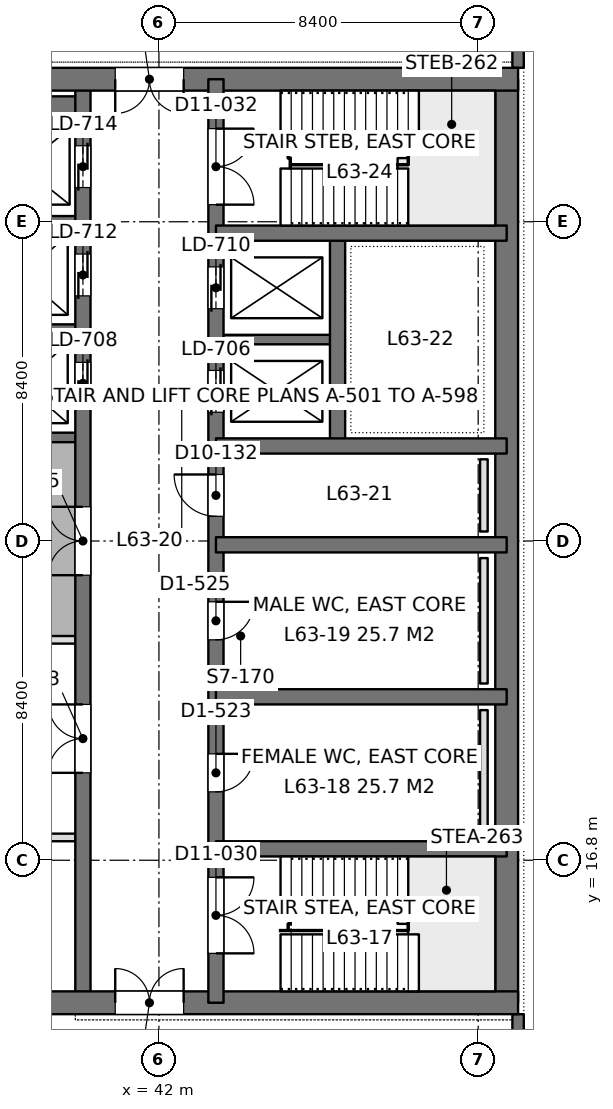
"""IFC4 building model, lengths in metres.
Left out: names, types, materials, properties, quantities, classifications, styles, units other than length and angle.
Written with IfcOpenShell. Run it as: python <this file> out.ifc"""

import sys

from ifc_helpers import new_model, si_unit, direction, frame, frame_2d, origin, place, context, subcontext, project, spatial, rectangle, extrude, element, fill, save


model = new_model("IFC4")
c1 = context("Model", 3, precision=1e-05, world=origin(), true_north=direction((0.0, 1.0)))
c2 = subcontext(c1, "Body", "Model", "MODEL_VIEW")
j1 = project(units=[si_unit("LENGTHUNIT", "METRE"), si_unit("PLANEANGLEUNIT", "RADIAN")], contexts=[c1])
p1 = place(None, origin())
s1 = spatial("IfcSite", under=j1, at=p1, CompositionType="ELEMENT")
p2 = place(p1, origin())
s2 = spatial("IfcBuilding", under=s1, at=p2, CompositionType="ELEMENT")
p3 = place(p2, frame((0.0, 0.0, 277.2)))
s3 = spatial("IfcBuildingStorey", under=s2, at=p3, CompositionType="ELEMENT", Elevation=277.2)
p4 = place(p3, frame((33.75, 13.05, 0.0), z_axis=(0.0, 0.0, 1.0), x_axis=(1.0, 0.0, 0.0)))
e1 = element("IfcWall", 1, at=p4, inside=s3, PredefinedType="SHEAR", context=c2, shape_type="SweptSolid", body=[
    extrude(rectangle(XDim=17.7, YDim=0.6, at=frame_2d((8.85, 0.0))), origin(), (0.0, 0.0, 1.0), 4.5),
])
p5 = place(p4, frame((7.1, 0.0, 0.0)))
e2 = element("IfcOpeningElement", 2, at=p5, cuts=e1, PredefinedType="OPENING", context=c2, shape_type="SweptSolid", body=[
    extrude(rectangle(XDim=1.8, YDim=2.4, at=frame_2d((0.9, 1.2))), frame((0.0, 0.31, 0.0), z_axis=(0.0, -1.0, 0.0), x_axis=(1.0, 0.0, 0.0)), (0.0, 0.0, 1.0), 0.62),
])
p6 = place(p3, frame((33.75, 37.35, 0.0), z_axis=(0.0, 0.0, 1.0), x_axis=(1.0, 0.0, 0.0)))
e3 = element("IfcWall", 3, at=p6, inside=s3, PredefinedType="SHEAR", context=c2, shape_type="SweptSolid", body=[
    extrude(rectangle(XDim=17.7, YDim=0.6, at=frame_2d((8.85, 0.0))), origin(), (0.0, 0.0, 1.0), 4.5),
])
p7 = place(p6, frame((7.1, 0.0, 0.0)))
e4 = element("IfcOpeningElement", 4, at=p7, cuts=e3, PredefinedType="OPENING", context=c2, shape_type="SweptSolid", body=[
    extrude(rectangle(XDim=1.8, YDim=2.4, at=frame_2d((0.9, 1.2))), frame((0.0, 0.31, 0.0), z_axis=(0.0, -1.0, 0.0), x_axis=(1.0, 0.0, 0.0)), (0.0, 0.0, 1.0), 0.62),
])
p8 = place(p3, frame((51.15, 13.05, 0.0), z_axis=(0.0, 0.0, 1.0), x_axis=(0.0, 1.0, 0.0)))
e5 = element("IfcWall", 5, at=p8, inside=s3, PredefinedType="SHEAR", context=c2, shape_type="SweptSolid", body=[
    extrude(rectangle(XDim=24.3, YDim=0.6, at=frame_2d((12.15, 0.0))), origin(), (0.0, 0.0, 1.0), 4.5),
])
p9 = place(p3, frame((43.5, 13.05, 0.0), z_axis=(0.0, 0.0, 1.0), x_axis=(0.0, 1.0, 0.0)))
e6 = element("IfcWall", 6, at=p9, inside=s3, PredefinedType="SHEAR", context=c2, shape_type="SweptSolid", body=[
    extrude(rectangle(XDim=24.3, YDim=0.4, at=frame_2d((12.15, 0.0))), origin(), (0.0, 0.0, 1.0), 4.5),
])
p10 = place(p9, frame((1.3, 0.0, 0.0)))
e7 = element("IfcOpeningElement", 7, at=p10, cuts=e6, PredefinedType="OPENING", context=c2, shape_type="SweptSolid", body=[
    extrude(rectangle(XDim=2.0, YDim=2.2, at=frame_2d((1.0, 1.1))), frame((0.0, 0.21, 0.0), z_axis=(0.0, -1.0, 0.0), x_axis=(1.0, 0.0, 0.0)), (0.0, 0.0, 1.0), 0.42),
])
p11 = place(p9, frame((21.0, 0.0, 0.0)))
e8 = element("IfcOpeningElement", 8, at=p11, cuts=e6, PredefinedType="OPENING", context=c2, shape_type="SweptSolid", body=[
    extrude(rectangle(XDim=2.0, YDim=2.2, at=frame_2d((1.0, 1.1))), frame((0.0, 0.21, 0.0), z_axis=(0.0, -1.0, 0.0), x_axis=(1.0, 0.0, 0.0)), (0.0, 0.0, 1.0), 0.42),
])
p12 = place(p9, frame((5.55, 0.0, 0.0)))
e9 = element("IfcOpeningElement", 9, at=p12, cuts=e6, PredefinedType="OPENING", context=c2, shape_type="SweptSolid", body=[
    extrude(rectangle(XDim=1.0, YDim=2.2, at=frame_2d((0.5, 1.1))), frame((0.0, 0.21, 0.0), z_axis=(0.0, -1.0, 0.0), x_axis=(1.0, 0.0, 0.0)), (0.0, 0.0, 1.0), 0.42),
])
p13 = place(p9, frame((9.55, 0.0, 0.0)))
e10 = element("IfcOpeningElement", 10, at=p13, cuts=e6, PredefinedType="OPENING", context=c2, shape_type="SweptSolid", body=[
    extrude(rectangle(XDim=1.0, YDim=2.2, at=frame_2d((0.5, 1.1))), frame((0.0, 0.21, 0.0), z_axis=(0.0, -1.0, 0.0), x_axis=(1.0, 0.0, 0.0)), (0.0, 0.0, 1.0), 0.42),
])
p14 = place(p9, frame((12.8, 0.0, 0.0)))
e11 = element("IfcOpeningElement", 11, at=p14, cuts=e6, PredefinedType="OPENING", context=c2, shape_type="SweptSolid", body=[
    extrude(rectangle(XDim=1.1, YDim=2.2, at=frame_2d((0.55, 1.1))), frame((0.0, 0.21, 0.0), z_axis=(0.0, -1.0, 0.0), x_axis=(1.0, 0.0, 0.0)), (0.0, 0.0, 1.0), 0.42),
])
p15 = place(p9, frame((15.538, 0.0, 0.0)))
e12 = element("IfcOpeningElement", 12, at=p15, cuts=e6, PredefinedType="OPENING", context=c2, shape_type="SweptSolid", body=[
    extrude(rectangle(XDim=1.1, YDim=2.2, at=frame_2d((0.55, 1.1))), frame((0.0, 0.21, 0.0), z_axis=(0.0, -1.0, 0.0), x_axis=(1.0, 0.0, 0.0)), (0.0, 0.0, 1.0), 0.42),
])
p16 = place(p9, frame((18.262, 0.0, 0.0)))
e13 = element("IfcOpeningElement", 13, at=p16, cuts=e6, PredefinedType="OPENING", context=c2, shape_type="SweptSolid", body=[
    extrude(rectangle(XDim=1.1, YDim=2.2, at=frame_2d((0.55, 1.1))), frame((0.0, 0.21, 0.0), z_axis=(0.0, -1.0, 0.0), x_axis=(1.0, 0.0, 0.0)), (0.0, 0.0, 1.0), 0.42),
])
p17 = place(p3, frame((40.0, 13.05, 0.0), z_axis=(0.0, 0.0, 1.0), x_axis=(0.0, 1.0, 0.0)))
e14 = element("IfcWall", 14, at=p17, inside=s3, PredefinedType="SHEAR", context=c2, shape_type="SweptSolid", body=[
    extrude(rectangle(XDim=24.3, YDim=0.4, at=frame_2d((12.15, 0.0))), origin(), (0.0, 0.0, 1.0), 4.5),
])
p18 = place(p17, frame((15.75, 0.0, 0.0)))
e15 = element("IfcOpeningElement", 15, at=p18, cuts=e14, PredefinedType="OPENING", context=c2, shape_type="SweptSolid", body=[
    extrude(rectangle(XDim=1.1, YDim=2.2, at=frame_2d((0.55, 1.1))), frame((0.0, 0.21, 0.0), z_axis=(0.0, -1.0, 0.0), x_axis=(1.0, 0.0, 0.0)), (0.0, 0.0, 1.0), 0.42),
])
p19 = place(p17, frame((18.6, 0.0, 0.0)))
e16 = element("IfcOpeningElement", 16, at=p19, cuts=e14, PredefinedType="OPENING", context=c2, shape_type="SweptSolid", body=[
    extrude(rectangle(XDim=1.1, YDim=2.2, at=frame_2d((0.55, 1.1))), frame((0.0, 0.21, 0.0), z_axis=(0.0, -1.0, 0.0), x_axis=(1.0, 0.0, 0.0)), (0.0, 0.0, 1.0), 0.42),
])
p20 = place(p17, frame((21.45, 0.0, 0.0)))
e17 = element("IfcOpeningElement", 17, at=p20, cuts=e14, PredefinedType="OPENING", context=c2, shape_type="SweptSolid", body=[
    extrude(rectangle(XDim=1.1, YDim=2.2, at=frame_2d((0.55, 1.1))), frame((0.0, 0.21, 0.0), z_axis=(0.0, -1.0, 0.0), x_axis=(1.0, 0.0, 0.0)), (0.0, 0.0, 1.0), 0.42),
])
p21 = place(p17, frame((6.05, 0.0, 0.0)))
e18 = element("IfcOpeningElement", 18, at=p21, cuts=e14, PredefinedType="OPENING", context=c2, shape_type="SweptSolid", body=[
    extrude(rectangle(XDim=1.8, YDim=2.4, at=frame_2d((0.9, 1.2))), frame((0.0, 0.21, 0.0), z_axis=(0.0, -1.0, 0.0), x_axis=(1.0, 0.0, 0.0)), (0.0, 0.0, 1.0), 0.42),
])
p22 = place(p17, frame((11.25, 0.0, 0.0)))
e19 = element("IfcOpeningElement", 19, at=p22, cuts=e14, PredefinedType="OPENING", context=c2, shape_type="SweptSolid", body=[
    extrude(rectangle(XDim=1.8, YDim=2.4, at=frame_2d((0.9, 1.2))), frame((0.0, 0.21, 0.0), z_axis=(0.0, -1.0, 0.0), x_axis=(1.0, 0.0, 0.0)), (0.0, 0.0, 1.0), 0.42),
])
for number, where, z_axis, x_axis in (
    (20, (51.15, 17.1, 0.0), (0.0, 0.0, 1.0), (-1.0, 0.0, 0.0)),
    (21, (51.15, 21.1, 0.0), (0.0, 0.0, 1.0), (-1.0, 0.0, 0.0)),
    (22, (51.15, 25.1, 0.0), (0.0, 0.0, 1.0), (-1.0, 0.0, 0.0)),
    (23, (51.15, 27.7, 0.0), (0.0, 0.0, 1.0), (-1.0, 0.0, 0.0)),
    (24, (51.15, 33.3, 0.0), (0.0, 0.0, 1.0), (-1.0, 0.0, 0.0)),
):
    element("IfcWall", number, at=place(p3, frame(where, z_axis=z_axis, x_axis=x_axis)), inside=s3, PredefinedType="SHEAR", context=c2, shape_type="SweptSolid", body=[
        extrude(rectangle(XDim=7.65, YDim=0.4, at=frame_2d((3.825, 0.0))), origin(), (0.0, 0.0, 1.0), 4.5),
    ])
p23 = place(p3, frame((46.7, 27.7, 0.0), z_axis=(0.0, 0.0, 1.0), x_axis=(0.0, 1.0, 0.0)))
e25 = element("IfcWall", 25, at=p23, inside=s3, PredefinedType="SHEAR", context=c2, shape_type="SweptSolid", body=[
    extrude(rectangle(XDim=5.6, YDim=0.4, at=frame_2d((2.8, 0.0))), origin(), (0.0, 0.0, 1.0), 4.5),
])
p24 = place(p3, frame((46.7, 30.5, 0.0), z_axis=(0.0, 0.0, 1.0), x_axis=(-1.0, 0.0, 0.0)))
e26 = element("IfcWall", 26, at=p24, inside=s3, PredefinedType="SHEAR", context=c2, shape_type="SweptSolid", body=[
    extrude(rectangle(XDim=3.2, YDim=0.25, at=frame_2d((1.6, 0.0))), origin(), (0.0, 0.0, 1.0), 4.5),
])
p25 = place(p3, frame((40.0, 27.925, 0.0), z_axis=(0.0, 0.0, 1.0), x_axis=(-1.0, 0.0, 0.0)))
e27 = element("IfcWall", 27, at=p25, inside=s3, PredefinedType="SHEAR", context=c2, shape_type="SweptSolid", body=[
    extrude(rectangle(XDim=5.95, YDim=0.25, at=frame_2d((2.975, 0.0))), origin(), (0.0, 0.0, 1.0), 4.5),
])
for number, where, z_axis, x_axis in (
    (28, (40.0, 30.775, 0.0), (0.0, 0.0, 1.0), (-1.0, 0.0, 0.0)),
    (29, (40.0, 33.625, 0.0), (0.0, 0.0, 1.0), (-1.0, 0.0, 0.0)),
):
    element("IfcWall", number, at=place(p3, frame(where, z_axis=z_axis, x_axis=x_axis)), inside=s3, PredefinedType="SHEAR", context=c2, shape_type="SweptSolid", body=[
        extrude(rectangle(XDim=3.2, YDim=0.25, at=frame_2d((1.6, 0.0))), origin(), (0.0, 0.0, 1.0), 4.5),
    ])
p26 = place(p3, frame((40.0, 36.625, 0.0), z_axis=(0.0, 0.0, 1.0), x_axis=(-1.0, 0.0, 0.0)))
e30 = element("IfcWall", 30, at=p26, inside=s3, PredefinedType="SHEAR", context=c2, shape_type="SweptSolid", body=[
    extrude(rectangle(XDim=3.2, YDim=0.55, at=frame_2d((1.6, 0.0))), origin(), (0.0, 0.0, 1.0), 4.5),
])
p27 = place(p3, frame((51.45, 42.0, 0.0), z_axis=(0.0, 0.0, 1.0), x_axis=(0.0, -1.0, 0.0)))
e31 = element("IfcWall", 31, at=p27, inside=s3, PredefinedType="SOLIDWALL", context=c2, shape_type="SweptSolid", body=[
    extrude(rectangle(XDim=4.35, YDim=0.3, at=frame_2d((2.175, 0.0))), origin(), (0.0, 0.0, 1.0), 4.3),
])
p28 = place(p27, frame((0.975, 0.0, 0.9)))
e32 = element("IfcOpeningElement", 32, at=p28, cuts=e31, PredefinedType="OPENING", context=c2, shape_type="SweptSolid", body=[
    extrude(rectangle(XDim=2.4, YDim=1.9, at=frame_2d((1.2, 0.95))), frame((0.0, 0.16, 0.0), z_axis=(0.0, -1.0, 0.0), x_axis=(1.0, 0.0, 0.0)), (0.0, 0.0, 1.0), 0.32),
])
p29 = place(p3, frame((51.45, 12.75, 0.0), z_axis=(0.0, 0.0, 1.0), x_axis=(0.0, -1.0, 0.0)))
e33 = element("IfcWall", 33, at=p29, inside=s3, PredefinedType="SOLIDWALL", context=c2, shape_type="SweptSolid", body=[
    extrude(rectangle(XDim=4.35, YDim=0.3, at=frame_2d((2.175, 0.0))), origin(), (0.0, 0.0, 1.0), 4.3),
])
p30 = place(p29, frame((0.975, 0.0, 0.9)))
e34 = element("IfcOpeningElement", 34, at=p30, cuts=e33, PredefinedType="OPENING", context=c2, shape_type="SweptSolid", body=[
    extrude(rectangle(XDim=2.4, YDim=1.9, at=frame_2d((1.2, 0.95))), frame((0.0, 0.16, 0.0), z_axis=(0.0, -1.0, 0.0), x_axis=(1.0, 0.0, 0.0)), (0.0, 0.0, 1.0), 0.32),
])
p31 = place(p3, frame((33.898, 17.4, 0.0), z_axis=(0.0, 0.0, 1.0), x_axis=(1.0, 0.0, 0.0)))
e35 = element("IfcWall", 35, at=p31, inside=s3, PredefinedType="PARTITIONING", context=c2, shape_type="SweptSolid", body=[
    extrude(rectangle(XDim=5.904, YDim=0.2, at=frame_2d((2.952, 0.0))), origin(), (0.0, 0.0, 1.0), 3.292),
])
p32 = place(p3, frame((34.749, 22.6, 0.0), z_axis=(0.0, 0.0, 1.0), x_axis=(1.0, 0.0, 0.0)))
e36 = element("IfcWall", 36, at=p32, inside=s3, PredefinedType="PARTITIONING", context=c2, shape_type="SweptSolid", body=[
    extrude(rectangle(XDim=5.053, YDim=0.2, at=frame_2d((2.526, 0.0))), origin(), (0.0, 0.0, 1.0), 4.3),
])
for number, where, z_axis, x_axis in (
    (37, (50.55, 17.45, 0.0), (0.0, 0.0, 1.0), (0.0, 1.0, 0.0)),
    (38, (50.55, 21.45, 0.0), (0.0, 0.0, 1.0), (0.0, 1.0, 0.0)),
):
    element("IfcWall", number, at=place(p3, frame(where, z_axis=z_axis, x_axis=x_axis)), inside=s3, PredefinedType="PLUMBINGWALL", context=c2, shape_type="SweptSolid", body=[
        extrude(rectangle(XDim=3.3, YDim=0.2, at=frame_2d((1.65, 0.0))), origin(), (0.0, 0.0, 1.0), 1.2),
    ])
p33 = place(p3, frame((50.55, 25.45, 0.0), z_axis=(0.0, 0.0, 1.0), x_axis=(0.0, 1.0, 0.0)))
e39 = element("IfcWall", 39, at=p33, inside=s3, PredefinedType="PLUMBINGWALL", context=c2, shape_type="SweptSolid", body=[
    extrude(rectangle(XDim=1.9, YDim=0.2, at=frame_2d((0.95, 0.0))), origin(), (0.0, 0.0, 1.0), 1.2),
])
p34 = place(p5, origin())
e40 = element("IfcDoor", 40, at=p34, inside=s3, OperationType="DOUBLE_DOOR_SINGLE_SWING", PredefinedType="DOOR", context=c2, shape_type="SweptSolid", body=[
    extrude(rectangle(XDim=1.8, YDim=2.4, at=frame_2d((0.9, 1.2))), frame((0.0, 0.025, 0.0), z_axis=(0.0, -1.0, 0.0), x_axis=(1.0, 0.0, 0.0)), (0.0, 0.0, 1.0), 0.05),
])
fill(e2, e40)
p35 = place(p7, frame((1.8, 0.0, 0.0), z_axis=(0.0, 0.0, 1.0), x_axis=(-1.0, 0.0, 0.0)))
e41 = element("IfcDoor", 41, at=p35, inside=s3, OperationType="DOUBLE_DOOR_SINGLE_SWING", PredefinedType="DOOR", context=c2, shape_type="SweptSolid", body=[
    extrude(rectangle(XDim=1.8, YDim=2.4, at=frame_2d((0.9, 1.2))), frame((0.0, 0.025, 0.0), z_axis=(0.0, -1.0, 0.0), x_axis=(1.0, 0.0, 0.0)), (0.0, 0.0, 1.0), 0.05),
])
fill(e4, e41)
p36 = place(p10, frame((2.0, 0.0, 0.0), z_axis=(0.0, 0.0, 1.0), x_axis=(-1.0, 0.0, 0.0)))
e42 = element("IfcDoor", 42, at=p36, inside=s3, OperationType="DOUBLE_DOOR_SINGLE_SWING", PredefinedType="DOOR", context=c2, shape_type="SweptSolid", body=[
    extrude(rectangle(XDim=2.0, YDim=2.2, at=frame_2d((1.0, 1.1))), frame((0.0, 0.025, 0.0), z_axis=(0.0, -1.0, 0.0), x_axis=(1.0, 0.0, 0.0)), (0.0, 0.0, 1.0), 0.05),
])
fill(e7, e42)
p37 = place(p11, frame((2.0, 0.0, 0.0), z_axis=(0.0, 0.0, 1.0), x_axis=(-1.0, 0.0, 0.0)))
e43 = element("IfcDoor", 43, at=p37, inside=s3, OperationType="DOUBLE_DOOR_SINGLE_SWING", PredefinedType="DOOR", context=c2, shape_type="SweptSolid", body=[
    extrude(rectangle(XDim=2.0, YDim=2.2, at=frame_2d((1.0, 1.1))), frame((0.0, 0.025, 0.0), z_axis=(0.0, -1.0, 0.0), x_axis=(1.0, 0.0, 0.0)), (0.0, 0.0, 1.0), 0.05),
])
fill(e8, e43)
p38 = place(p12, frame((1.0, 0.0, 0.0), z_axis=(0.0, 0.0, 1.0), x_axis=(-1.0, 0.0, 0.0)))
e44 = element("IfcDoor", 44, at=p38, inside=s3, OperationType="SINGLE_SWING_LEFT", PredefinedType="DOOR", context=c2, shape_type="SweptSolid", body=[
    extrude(rectangle(XDim=1.0, YDim=2.2, at=frame_2d((0.5, 1.1))), frame((0.0, 0.025, 0.0), z_axis=(0.0, -1.0, 0.0), x_axis=(1.0, 0.0, 0.0)), (0.0, 0.0, 1.0), 0.05),
])
fill(e9, e44)
p39 = place(p13, frame((1.0, 0.0, 0.0), z_axis=(0.0, 0.0, 1.0), x_axis=(-1.0, 0.0, 0.0)))
e45 = element("IfcDoor", 45, at=p39, inside=s3, OperationType="SINGLE_SWING_LEFT", PredefinedType="DOOR", context=c2, shape_type="SweptSolid", body=[
    extrude(rectangle(XDim=1.0, YDim=2.2, at=frame_2d((0.5, 1.1))), frame((0.0, 0.025, 0.0), z_axis=(0.0, -1.0, 0.0), x_axis=(1.0, 0.0, 0.0)), (0.0, 0.0, 1.0), 0.05),
])
fill(e10, e45)
p40 = place(p14, origin())
e46 = element("IfcDoor", 46, at=p40, inside=s3, OperationType="SINGLE_SWING_RIGHT", PredefinedType="DOOR", context=c2, shape_type="SweptSolid", body=[
    extrude(rectangle(XDim=1.1, YDim=2.2, at=frame_2d((0.55, 1.1))), frame((0.0, 0.025, 0.0), z_axis=(0.0, -1.0, 0.0), x_axis=(1.0, 0.0, 0.0)), (0.0, 0.0, 1.0), 0.05),
])
fill(e11, e46)
p41 = place(p18, origin())
e47 = element("IfcDoor", 47, at=p41, inside=s3, OperationType="DOUBLE_DOOR_SLIDING", PredefinedType="DOOR", context=c2, shape_type="SweptSolid", body=[
    extrude(rectangle(XDim=1.1, YDim=2.2, at=frame_2d((0.55, 1.1))), frame((0.0, 0.025, 0.0), z_axis=(0.0, -1.0, 0.0), x_axis=(1.0, 0.0, 0.0)), (0.0, 0.0, 1.0), 0.05),
])
fill(e15, e47)
p42 = place(p19, origin())
e48 = element("IfcDoor", 48, at=p42, inside=s3, OperationType="DOUBLE_DOOR_SLIDING", PredefinedType="DOOR", context=c2, shape_type="SweptSolid", body=[
    extrude(rectangle(XDim=1.1, YDim=2.2, at=frame_2d((0.55, 1.1))), frame((0.0, 0.025, 0.0), z_axis=(0.0, -1.0, 0.0), x_axis=(1.0, 0.0, 0.0)), (0.0, 0.0, 1.0), 0.05),
])
fill(e16, e48)
p43 = place(p20, origin())
e49 = element("IfcDoor", 49, at=p43, inside=s3, OperationType="DOUBLE_DOOR_SLIDING", PredefinedType="DOOR", context=c2, shape_type="SweptSolid", body=[
    extrude(rectangle(XDim=1.1, YDim=2.2, at=frame_2d((0.55, 1.1))), frame((0.0, 0.025, 0.0), z_axis=(0.0, -1.0, 0.0), x_axis=(1.0, 0.0, 0.0)), (0.0, 0.0, 1.0), 0.05),
])
fill(e17, e49)
p44 = place(p15, origin())
e50 = element("IfcDoor", 50, at=p44, inside=s3, OperationType="DOUBLE_DOOR_SLIDING", PredefinedType="DOOR", context=c2, shape_type="SweptSolid", body=[
    extrude(rectangle(XDim=1.1, YDim=2.2, at=frame_2d((0.55, 1.1))), frame((0.0, 0.025, 0.0), z_axis=(0.0, -1.0, 0.0), x_axis=(1.0, 0.0, 0.0)), (0.0, 0.0, 1.0), 0.05),
])
fill(e12, e50)
p45 = place(p16, origin())
e51 = element("IfcDoor", 51, at=p45, inside=s3, OperationType="DOUBLE_DOOR_SLIDING", PredefinedType="DOOR", context=c2, shape_type="SweptSolid", body=[
    extrude(rectangle(XDim=1.1, YDim=2.2, at=frame_2d((0.55, 1.1))), frame((0.0, 0.025, 0.0), z_axis=(0.0, -1.0, 0.0), x_axis=(1.0, 0.0, 0.0)), (0.0, 0.0, 1.0), 0.05),
])
fill(e13, e51)
p46 = place(p21, origin())
e52 = element("IfcDoor", 52, at=p46, inside=s3, OperationType="DOUBLE_DOOR_SINGLE_SWING", PredefinedType="DOOR", context=c2, shape_type="SweptSolid", body=[
    extrude(rectangle(XDim=1.8, YDim=2.4, at=frame_2d((0.9, 1.2))), frame((0.0, 0.025, 0.0), z_axis=(0.0, -1.0, 0.0), x_axis=(1.0, 0.0, 0.0)), (0.0, 0.0, 1.0), 0.05),
])
fill(e18, e52)
p47 = place(p22, origin())
e53 = element("IfcDoor", 53, at=p47, inside=s3, OperationType="DOUBLE_DOOR_SINGLE_SWING", PredefinedType="DOOR", context=c2, shape_type="SweptSolid", body=[
    extrude(rectangle(XDim=1.8, YDim=2.4, at=frame_2d((0.9, 1.2))), frame((0.0, 0.025, 0.0), z_axis=(0.0, -1.0, 0.0), x_axis=(1.0, 0.0, 0.0)), (0.0, 0.0, 1.0), 0.05),
])
fill(e19, e53)
save(model, sys.argv[1])
